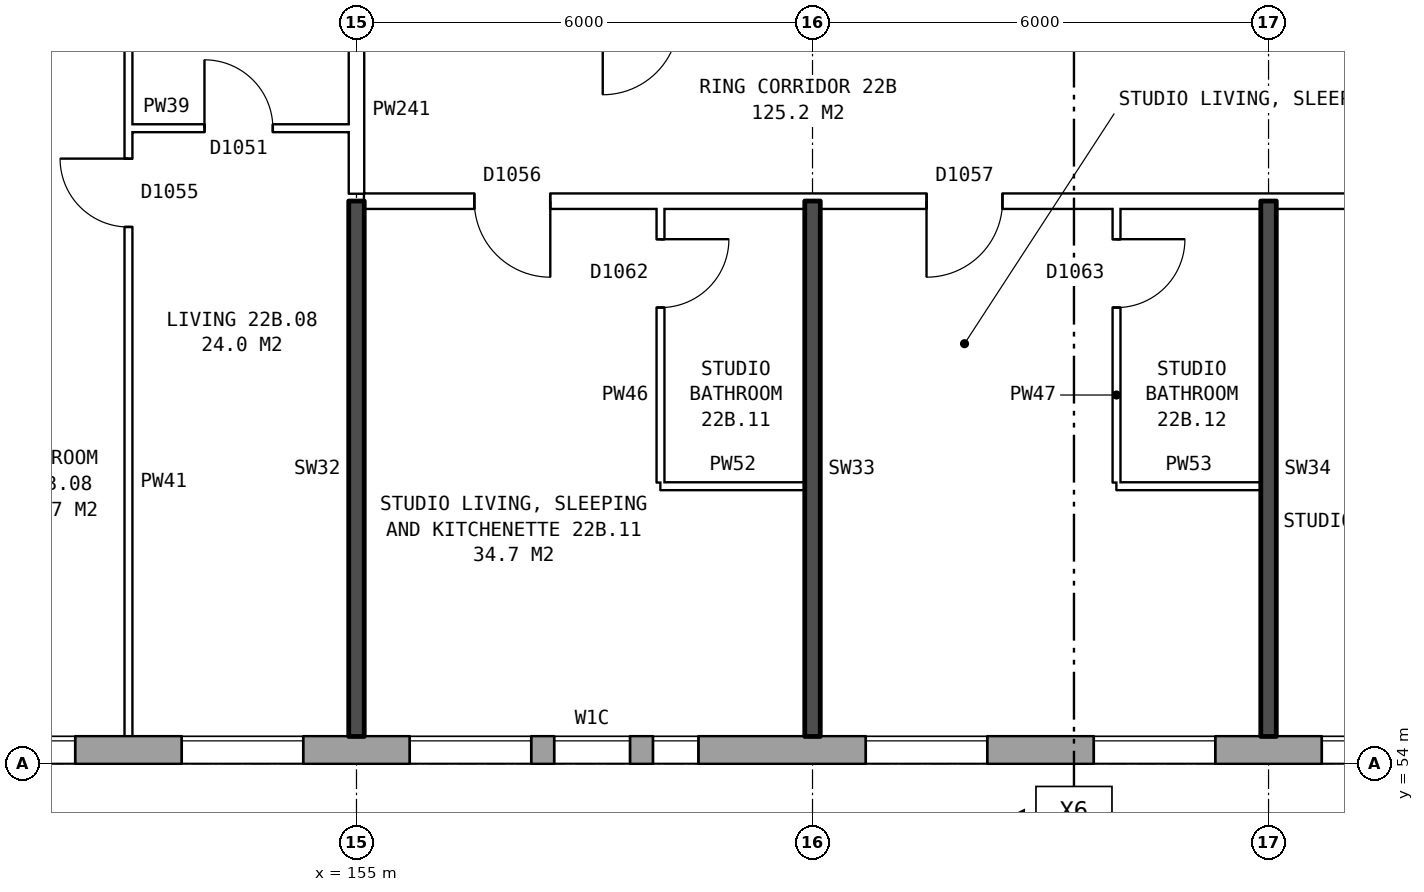
"""IFC4 building model, lengths in metres.
Left out: names, types, materials, properties, quantities, classifications, styles, units other than length and angle.
Written with IfcOpenShell. Run it as: python <this file> out.ifc"""

import sys

from ifc_helpers import new_model, si_unit, direction, frame, frame_2d, origin, place, context, subcontext, project, spatial, rectangle, extrude, element, fill, save


model = new_model("IFC4")
c1 = context("Model", 3, precision=1e-05, world=origin(), true_north=direction((0.0, 1.0)))
c2 = subcontext(c1, "Body", "Model", "MODEL_VIEW")
j1 = project(units=[si_unit("LENGTHUNIT", "METRE"), si_unit("PLANEANGLEUNIT", "RADIAN")], contexts=[c1])
p1 = place(None, origin())
s1 = spatial("IfcSite", under=j1, at=p1, CompositionType="ELEMENT")
p2 = place(p1, origin())
s2 = spatial("IfcBuilding", under=s1, at=p2, CompositionType="ELEMENT")
p3 = place(p2, frame((0.0, 0.0, 80.9)))
s3 = spatial("IfcBuildingStorey", under=s2, at=p3, CompositionType="ELEMENT", Elevation=80.9)
p4 = place(p3, frame((134.075, 54.18, 0.0), z_axis=(0.0, 0.0, 1.0), x_axis=(1.0, 0.0, 0.0)))
e1 = element("IfcWall", 1, at=p4, inside=s3, PredefinedType="STANDARD", context=c2, shape_type="SweptSolid", body=[
    extrude(rectangle(XDim=38.101, YDim=0.36, at=frame_2d((19.05, 0.0))), origin(), (0.0, 0.0, 1.0), 2.85),
])
p5 = place(p4, frame((0.625, 0.0, 0.8)))
e2 = element("IfcOpeningElement", 2, at=p5, cuts=e1, PredefinedType="OPENING", context=c2, shape_type="SweptSolid", body=[
    extrude(rectangle(XDim=1.6, YDim=1.8, at=frame_2d((0.8, 0.9))), frame((0.0, 0.19, 0.0), z_axis=(0.0, -1.0, 0.0), x_axis=(1.0, 0.0, 0.0)), (0.0, 0.0, 1.0), 0.38),
])
p6 = place(p4, frame((3.625, 0.0, 0.8)))
e3 = element("IfcOpeningElement", 3, at=p6, cuts=e1, PredefinedType="OPENING", context=c2, shape_type="SweptSolid", body=[
    extrude(rectangle(XDim=1.6, YDim=1.8, at=frame_2d((0.8, 0.9))), frame((0.0, 0.19, 0.0), z_axis=(0.0, -1.0, 0.0), x_axis=(1.0, 0.0, 0.0)), (0.0, 0.0, 1.0), 0.38),
])
p7 = place(p4, frame((6.625, 0.0, 0.8)))
e4 = element("IfcOpeningElement", 4, at=p7, cuts=e1, PredefinedType="OPENING", context=c2, shape_type="SweptSolid", body=[
    extrude(rectangle(XDim=1.6, YDim=1.8, at=frame_2d((0.8, 0.9))), frame((0.0, 0.19, 0.0), z_axis=(0.0, -1.0, 0.0), x_axis=(1.0, 0.0, 0.0)), (0.0, 0.0, 1.0), 0.38),
])
p8 = place(p4, frame((9.125, 0.0, 0.8)))
e5 = element("IfcOpeningElement", 5, at=p8, cuts=e1, PredefinedType="OPENING", context=c2, shape_type="SweptSolid", body=[
    extrude(rectangle(XDim=1.4, YDim=1.8, at=frame_2d((0.7, 0.9))), frame((0.0, 0.19, 0.0), z_axis=(0.0, -1.0, 0.0), x_axis=(1.0, 0.0, 0.0)), (0.0, 0.0, 1.0), 0.38),
])
p9 = place(p4, frame((12.575, 0.0, 0.8)))
e6 = element("IfcOpeningElement", 6, at=p9, cuts=e1, PredefinedType="OPENING", context=c2, shape_type="SweptSolid", body=[
    extrude(rectangle(XDim=0.6, YDim=0.9, at=frame_2d((0.3, 0.45))), frame((0.0, 0.19, 0.0), z_axis=(0.0, -1.0, 0.0), x_axis=(1.0, 0.0, 0.0)), (0.0, 0.0, 1.0), 0.38),
])
p10 = place(p4, frame((15.625, 0.0, 0.8)))
e7 = element("IfcOpeningElement", 7, at=p10, cuts=e1, PredefinedType="OPENING", context=c2, shape_type="SweptSolid", body=[
    extrude(rectangle(XDim=1.6, YDim=1.8, at=frame_2d((0.8, 0.9))), frame((0.0, 0.19, 0.0), z_axis=(0.0, -1.0, 0.0), x_axis=(1.0, 0.0, 0.0)), (0.0, 0.0, 1.0), 0.38),
])
p11 = place(p4, frame((18.625, 0.0, 0.8)))
e8 = element("IfcOpeningElement", 8, at=p11, cuts=e1, PredefinedType="OPENING", context=c2, shape_type="SweptSolid", body=[
    extrude(rectangle(XDim=1.6, YDim=1.8, at=frame_2d((0.8, 0.9))), frame((0.0, 0.19, 0.0), z_axis=(0.0, -1.0, 0.0), x_axis=(1.0, 0.0, 0.0)), (0.0, 0.0, 1.0), 0.38),
])
p12 = place(p4, frame((21.625, 0.0, 0.8)))
e9 = element("IfcOpeningElement", 9, at=p12, cuts=e1, PredefinedType="OPENING", context=c2, shape_type="SweptSolid", body=[
    extrude(rectangle(XDim=1.6, YDim=1.8, at=frame_2d((0.8, 0.9))), frame((0.0, 0.19, 0.0), z_axis=(0.0, -1.0, 0.0), x_axis=(1.0, 0.0, 0.0)), (0.0, 0.0, 1.0), 0.38),
])
p13 = place(p4, frame((23.525, 0.0, 0.8)))
e10 = element("IfcOpeningElement", 10, at=p13, cuts=e1, PredefinedType="OPENING", context=c2, shape_type="SweptSolid", body=[
    extrude(rectangle(XDim=1.0, YDim=1.8, at=frame_2d((0.5, 0.9))), frame((0.0, 0.19, 0.0), z_axis=(0.0, -1.0, 0.0), x_axis=(1.0, 0.0, 0.0)), (0.0, 0.0, 1.0), 0.38),
])
p14 = place(p4, frame((27.625, 0.0, 0.8)))
e11 = element("IfcOpeningElement", 11, at=p14, cuts=e1, PredefinedType="OPENING", context=c2, shape_type="SweptSolid", body=[
    extrude(rectangle(XDim=1.6, YDim=1.8, at=frame_2d((0.8, 0.9))), frame((0.0, 0.19, 0.0), z_axis=(0.0, -1.0, 0.0), x_axis=(1.0, 0.0, 0.0)), (0.0, 0.0, 1.0), 0.38),
])
p15 = place(p4, frame((30.625, 0.0, 0.8)))
e12 = element("IfcOpeningElement", 12, at=p15, cuts=e1, PredefinedType="OPENING", context=c2, shape_type="SweptSolid", body=[
    extrude(rectangle(XDim=1.6, YDim=1.8, at=frame_2d((0.8, 0.9))), frame((0.0, 0.19, 0.0), z_axis=(0.0, -1.0, 0.0), x_axis=(1.0, 0.0, 0.0)), (0.0, 0.0, 1.0), 0.38),
])
p16 = place(p4, frame((33.625, 0.0, 0.8)))
e13 = element("IfcOpeningElement", 13, at=p16, cuts=e1, PredefinedType="OPENING", context=c2, shape_type="SweptSolid", body=[
    extrude(rectangle(XDim=1.6, YDim=1.8, at=frame_2d((0.8, 0.9))), frame((0.0, 0.19, 0.0), z_axis=(0.0, -1.0, 0.0), x_axis=(1.0, 0.0, 0.0)), (0.0, 0.0, 1.0), 0.38),
])
p17 = place(p4, frame((10.825, 0.0, 1.7)))
e14 = element("IfcOpeningElement", 14, at=p17, cuts=e1, PredefinedType="OPENING", context=c2, shape_type="SweptSolid", body=[
    extrude(rectangle(XDim=0.6, YDim=0.9, at=frame_2d((0.3, 0.45))), frame((0.0, 0.19, 0.0), z_axis=(0.0, -1.0, 0.0), x_axis=(1.0, 0.0, 0.0)), (0.0, 0.0, 1.0), 0.38),
])
p18 = place(p4, frame((13.475, 0.0, 0.8)))
e15 = element("IfcOpeningElement", 15, at=p18, cuts=e1, PredefinedType="OPENING", context=c2, shape_type="SweptSolid", body=[
    extrude(rectangle(XDim=1.2, YDim=1.8, at=frame_2d((0.6, 0.9))), frame((0.0, 0.19, 0.0), z_axis=(0.0, -1.0, 0.0), x_axis=(1.0, 0.0, 0.0)), (0.0, 0.0, 1.0), 0.38),
])
p19 = place(p4, frame((24.825, 0.0, 0.8)))
e16 = element("IfcOpeningElement", 16, at=p19, cuts=e1, PredefinedType="OPENING", context=c2, shape_type="SweptSolid", body=[
    extrude(rectangle(XDim=0.6, YDim=0.9, at=frame_2d((0.3, 0.45))), frame((0.0, 0.19, 0.0), z_axis=(0.0, -1.0, 0.0), x_axis=(1.0, 0.0, 0.0)), (0.0, 0.0, 1.0), 0.38),
])
for number, where, z_axis, x_axis in (
    (17, (159.0, 57.65, 0.0), (0.0, 0.0, 1.0), (1.0, 0.0, 0.0)),
    (18, (165.0, 57.65, 0.0), (0.0, 0.0, 1.0), (1.0, 0.0, 0.0)),
):
    element("IfcWall", number, at=place(p3, frame(where, z_axis=z_axis, x_axis=x_axis)), inside=s3, PredefinedType="PARTITIONING", context=c2, shape_type="SweptSolid", body=[
        extrude(rectangle(XDim=1.9, YDim=0.1, at=frame_2d((0.95, 0.0))), origin(), (0.0, 0.0, 1.0), 2.85),
    ])
p20 = place(p3, frame((155.1, 61.4, 0.0), z_axis=(0.0, 0.0, 1.0), x_axis=(1.0, 0.0, 0.0)))
e19 = element("IfcWall", 19, at=p20, inside=s3, PredefinedType="PARTITIONING", context=c2, shape_type="SweptSolid", body=[
    extrude(rectangle(XDim=19.79, YDim=0.2, at=frame_2d((9.895, 0.0))), origin(), (0.0, 0.0, 1.0), 2.85),
])
p21 = place(p20, frame((1.45, 0.0, 0.0)))
e20 = element("IfcOpeningElement", 20, at=p21, cuts=e19, PredefinedType="OPENING", context=c2, shape_type="SweptSolid", body=[
    extrude(rectangle(XDim=1.0, YDim=2.1, at=frame_2d((0.5, 1.05))), frame((0.0, 0.11, 0.0), z_axis=(0.0, -1.0, 0.0), x_axis=(1.0, 0.0, 0.0)), (0.0, 0.0, 1.0), 0.22),
])
p22 = place(p20, frame((7.4, 0.0, 0.0)))
e21 = element("IfcOpeningElement", 21, at=p22, cuts=e19, PredefinedType="OPENING", context=c2, shape_type="SweptSolid", body=[
    extrude(rectangle(XDim=1.0, YDim=2.1, at=frame_2d((0.5, 1.05))), frame((0.0, 0.11, 0.0), z_axis=(0.0, -1.0, 0.0), x_axis=(1.0, 0.0, 0.0)), (0.0, 0.0, 1.0), 0.22),
])
p23 = place(p20, frame((13.2, 0.0, 0.0)))
e22 = element("IfcOpeningElement", 22, at=p23, cuts=e19, PredefinedType="OPENING", context=c2, shape_type="SweptSolid", body=[
    extrude(rectangle(XDim=1.0, YDim=2.1, at=frame_2d((0.5, 1.05))), frame((0.0, 0.11, 0.0), z_axis=(0.0, -1.0, 0.0), x_axis=(1.0, 0.0, 0.0)), (0.0, 0.0, 1.0), 0.22),
])
p24 = place(p3, frame((152.0, 62.36, 0.0), z_axis=(0.0, 0.0, 1.0), x_axis=(1.0, 0.0, 0.0)))
e23 = element("IfcWall", 23, at=p24, inside=s3, PredefinedType="PARTITIONING", context=c2, shape_type="SweptSolid", body=[
    extrude(rectangle(XDim=2.9, YDim=0.1, at=frame_2d((1.45, 0.0))), origin(), (0.0, 0.0, 1.0), 2.85),
])
p25 = place(p24, frame((1.0, 0.0, 0.0)))
e24 = element("IfcOpeningElement", 24, at=p25, cuts=e23, PredefinedType="OPENING", context=c2, shape_type="SweptSolid", body=[
    extrude(rectangle(XDim=0.9, YDim=2.1, at=frame_2d((0.45, 1.05))), frame((0.0, 0.06, 0.0), z_axis=(0.0, -1.0, 0.0), x_axis=(1.0, 0.0, 0.0)), (0.0, 0.0, 1.0), 0.12),
])
p26 = place(p3, frame((152.0, 54.36, 0.0), z_axis=(0.0, 0.0, 1.0), x_axis=(0.0, 1.0, 0.0)))
e25 = element("IfcWall", 25, at=p26, inside=s3, PredefinedType="PARTITIONING", context=c2, shape_type="SweptSolid", body=[
    extrude(rectangle(XDim=14.34, YDim=0.1, at=frame_2d((7.17, 0.0))), origin(), (0.0, 0.0, 1.0), 2.85),
])
p27 = place(p26, frame((6.7, 0.0, 0.0)))
e26 = element("IfcOpeningElement", 26, at=p27, cuts=e25, PredefinedType="OPENING", context=c2, shape_type="SweptSolid", body=[
    extrude(rectangle(XDim=0.9, YDim=2.1, at=frame_2d((0.45, 1.05))), frame((0.0, 0.06, 0.0), z_axis=(0.0, -1.0, 0.0), x_axis=(1.0, 0.0, 0.0)), (0.0, 0.0, 1.0), 0.12),
])
p28 = place(p26, frame((13.04, 0.0, 0.0)))
e27 = element("IfcOpeningElement", 27, at=p28, cuts=e25, PredefinedType="OPENING", context=c2, shape_type="SweptSolid", body=[
    extrude(rectangle(XDim=0.9, YDim=2.1, at=frame_2d((0.45, 1.05))), frame((0.0, 0.06, 0.0), z_axis=(0.0, -1.0, 0.0), x_axis=(1.0, 0.0, 0.0)), (0.0, 0.0, 1.0), 0.12),
])
p29 = place(p3, frame((155.0, 54.36, 0.0), z_axis=(0.0, 0.0, 1.0), x_axis=(0.0, 1.0, 0.0)))
e28 = element("IfcWall", 28, at=p29, inside=s3, PredefinedType="SOLIDWALL", context=c2, shape_type="SweptSolid", body=[
    extrude(rectangle(XDim=7.04, YDim=0.2, at=frame_2d((3.52, 0.0))), origin(), (0.0, 0.0, 1.0), 2.85),
])
p30 = place(p3, frame((155.0, 61.5, 0.0), z_axis=(0.0, 0.0, 1.0), x_axis=(0.0, 1.0, 0.0)))
e29 = element("IfcWall", 29, at=p30, inside=s3, PredefinedType="PARTITIONING", context=c2, shape_type="SweptSolid", body=[
    extrude(rectangle(XDim=2.2, YDim=0.2, at=frame_2d((1.1, 0.0))), origin(), (0.0, 0.0, 1.0), 2.85),
])
p31 = place(p3, frame((159.0, 57.7, 0.0), z_axis=(0.0, 0.0, 1.0), x_axis=(0.0, 1.0, 0.0)))
e30 = element("IfcWall", 30, at=p31, inside=s3, PredefinedType="PARTITIONING", context=c2, shape_type="SweptSolid", body=[
    extrude(rectangle(XDim=3.6, YDim=0.1, at=frame_2d((1.8, 0.0))), origin(), (0.0, 0.0, 1.0), 2.85),
])
p32 = place(p31, frame((2.3, 0.0, 0.0)))
e31 = element("IfcOpeningElement", 31, at=p32, cuts=e30, PredefinedType="OPENING", context=c2, shape_type="SweptSolid", body=[
    extrude(rectangle(XDim=0.9, YDim=2.1, at=frame_2d((0.45, 1.05))), frame((0.0, 0.06, 0.0), z_axis=(0.0, -1.0, 0.0), x_axis=(1.0, 0.0, 0.0)), (0.0, 0.0, 1.0), 0.12),
])
p33 = place(p3, frame((161.0, 54.36, 0.0), z_axis=(0.0, 0.0, 1.0), x_axis=(0.0, 1.0, 0.0)))
e32 = element("IfcWall", 32, at=p33, inside=s3, PredefinedType="SOLIDWALL", context=c2, shape_type="SweptSolid", body=[
    extrude(rectangle(XDim=7.04, YDim=0.2, at=frame_2d((3.52, 0.0))), origin(), (0.0, 0.0, 1.0), 2.85),
])
p34 = place(p3, frame((165.0, 57.7, 0.0), z_axis=(0.0, 0.0, 1.0), x_axis=(0.0, 1.0, 0.0)))
e33 = element("IfcWall", 33, at=p34, inside=s3, PredefinedType="PARTITIONING", context=c2, shape_type="SweptSolid", body=[
    extrude(rectangle(XDim=3.6, YDim=0.1, at=frame_2d((1.8, 0.0))), origin(), (0.0, 0.0, 1.0), 2.85),
])
p35 = place(p34, frame((2.3, 0.0, 0.0)))
e34 = element("IfcOpeningElement", 34, at=p35, cuts=e33, PredefinedType="OPENING", context=c2, shape_type="SweptSolid", body=[
    extrude(rectangle(XDim=0.9, YDim=2.1, at=frame_2d((0.45, 1.05))), frame((0.0, 0.06, 0.0), z_axis=(0.0, -1.0, 0.0), x_axis=(1.0, 0.0, 0.0)), (0.0, 0.0, 1.0), 0.12),
])
p36 = place(p3, frame((167.0, 54.36, 0.0), z_axis=(0.0, 0.0, 1.0), x_axis=(0.0, 1.0, 0.0)))
e35 = element("IfcWall", 35, at=p36, inside=s3, PredefinedType="SOLIDWALL", context=c2, shape_type="SweptSolid", body=[
    extrude(rectangle(XDim=7.04, YDim=0.2, at=frame_2d((3.52, 0.0))), origin(), (0.0, 0.0, 1.0), 2.85),
])
p37 = place(p10, origin())
e36 = element("IfcWindow", 36, at=p37, inside=s3, PartitioningType="SINGLE_PANEL", PredefinedType="WINDOW", context=c2, shape_type="SweptSolid", body=[
    extrude(rectangle(XDim=1.6, YDim=1.8, at=frame_2d((0.8, 0.9))), frame((0.0, 0.15, 0.0), z_axis=(0.0, -1.0, 0.0), x_axis=(1.0, 0.0, 0.0)), (0.0, 0.0, 1.0), 0.06),
])
fill(e7, e36)
p38 = place(p11, origin())
e37 = element("IfcWindow", 37, at=p38, inside=s3, PartitioningType="SINGLE_PANEL", PredefinedType="WINDOW", context=c2, shape_type="SweptSolid", body=[
    extrude(rectangle(XDim=1.6, YDim=1.8, at=frame_2d((0.8, 0.9))), frame((0.0, 0.15, 0.0), z_axis=(0.0, -1.0, 0.0), x_axis=(1.0, 0.0, 0.0)), (0.0, 0.0, 1.0), 0.06),
])
fill(e8, e37)
p39 = place(p12, origin())
e38 = element("IfcWindow", 38, at=p39, inside=s3, PartitioningType="SINGLE_PANEL", PredefinedType="WINDOW", context=c2, shape_type="SweptSolid", body=[
    extrude(rectangle(XDim=1.6, YDim=1.8, at=frame_2d((0.8, 0.9))), frame((0.0, 0.15, 0.0), z_axis=(0.0, -1.0, 0.0), x_axis=(1.0, 0.0, 0.0)), (0.0, 0.0, 1.0), 0.06),
])
fill(e9, e38)
p40 = place(p13, origin())
e39 = element("IfcWindow", 39, at=p40, inside=s3, PartitioningType="SINGLE_PANEL", PredefinedType="WINDOW", context=c2, shape_type="SweptSolid", body=[
    extrude(rectangle(XDim=1.0, YDim=1.8, at=frame_2d((0.5, 0.9))), frame((0.0, 0.15, 0.0), z_axis=(0.0, -1.0, 0.0), x_axis=(1.0, 0.0, 0.0)), (0.0, 0.0, 1.0), 0.06),
])
fill(e10, e39)
p41 = place(p14, origin())
e40 = element("IfcWindow", 40, at=p41, inside=s3, PartitioningType="SINGLE_PANEL", PredefinedType="WINDOW", context=c2, shape_type="SweptSolid", body=[
    extrude(rectangle(XDim=1.6, YDim=1.8, at=frame_2d((0.8, 0.9))), frame((0.0, 0.15, 0.0), z_axis=(0.0, -1.0, 0.0), x_axis=(1.0, 0.0, 0.0)), (0.0, 0.0, 1.0), 0.06),
])
fill(e11, e40)
p42 = place(p15, origin())
e41 = element("IfcWindow", 41, at=p42, inside=s3, PartitioningType="SINGLE_PANEL", PredefinedType="WINDOW", context=c2, shape_type="SweptSolid", body=[
    extrude(rectangle(XDim=1.6, YDim=1.8, at=frame_2d((0.8, 0.9))), frame((0.0, 0.15, 0.0), z_axis=(0.0, -1.0, 0.0), x_axis=(1.0, 0.0, 0.0)), (0.0, 0.0, 1.0), 0.06),
])
fill(e12, e41)
p43 = place(p16, origin())
e42 = element("IfcWindow", 42, at=p43, inside=s3, PartitioningType="SINGLE_PANEL", PredefinedType="WINDOW", context=c2, shape_type="SweptSolid", body=[
    extrude(rectangle(XDim=1.6, YDim=1.8, at=frame_2d((0.8, 0.9))), frame((0.0, 0.15, 0.0), z_axis=(0.0, -1.0, 0.0), x_axis=(1.0, 0.0, 0.0)), (0.0, 0.0, 1.0), 0.06),
])
fill(e13, e42)
p44 = place(p27, origin())
e43 = element("IfcDoor", 43, at=p44, inside=s3, OperationType="SINGLE_SWING_RIGHT", PredefinedType="DOOR", context=c2, shape_type="SweptSolid", body=[
    extrude(rectangle(XDim=0.9, YDim=2.1, at=frame_2d((0.45, 1.05))), frame((0.0, 0.025, 0.0), z_axis=(0.0, -1.0, 0.0), x_axis=(1.0, 0.0, 0.0)), (0.0, 0.0, 1.0), 0.05),
])
fill(e26, e43)
p45 = place(p25, origin())
e44 = element("IfcDoor", 44, at=p45, inside=s3, OperationType="SINGLE_SWING_LEFT", PredefinedType="DOOR", context=c2, shape_type="SweptSolid", body=[
    extrude(rectangle(XDim=0.9, YDim=2.1, at=frame_2d((0.45, 1.05))), frame((0.0, 0.025, 0.0), z_axis=(0.0, -1.0, 0.0), x_axis=(1.0, 0.0, 0.0)), (0.0, 0.0, 1.0), 0.05),
])
fill(e24, e44)
p46 = place(p21, frame((1.0, 0.0, 0.0), z_axis=(0.0, 0.0, 1.0), x_axis=(-1.0, 0.0, 0.0)))
e45 = element("IfcDoor", 45, at=p46, inside=s3, OperationType="SINGLE_SWING_LEFT", PredefinedType="DOOR", context=c2, shape_type="SweptSolid", body=[
    extrude(rectangle(XDim=1.0, YDim=2.1, at=frame_2d((0.5, 1.05))), frame((0.0, 0.025, 0.0), z_axis=(0.0, -1.0, 0.0), x_axis=(1.0, 0.0, 0.0)), (0.0, 0.0, 1.0), 0.05),
])
fill(e20, e45)
p47 = place(p32, frame((0.9, 0.0, 0.0), z_axis=(0.0, 0.0, 1.0), x_axis=(-1.0, 0.0, 0.0)))
e46 = element("IfcDoor", 46, at=p47, inside=s3, OperationType="SINGLE_SWING_LEFT", PredefinedType="DOOR", context=c2, shape_type="SweptSolid", body=[
    extrude(rectangle(XDim=0.9, YDim=2.1, at=frame_2d((0.45, 1.05))), frame((0.0, 0.025, 0.0), z_axis=(0.0, -1.0, 0.0), x_axis=(1.0, 0.0, 0.0)), (0.0, 0.0, 1.0), 0.05),
])
fill(e31, e46)
p48 = place(p22, frame((1.0, 0.0, 0.0), z_axis=(0.0, 0.0, 1.0), x_axis=(-1.0, 0.0, 0.0)))
e47 = element("IfcDoor", 47, at=p48, inside=s3, OperationType="SINGLE_SWING_RIGHT", PredefinedType="DOOR", context=c2, shape_type="SweptSolid", body=[
    extrude(rectangle(XDim=1.0, YDim=2.1, at=frame_2d((0.5, 1.05))), frame((0.0, 0.025, 0.0), z_axis=(0.0, -1.0, 0.0), x_axis=(1.0, 0.0, 0.0)), (0.0, 0.0, 1.0), 0.05),
])
fill(e21, e47)
p49 = place(p35, frame((0.9, 0.0, 0.0), z_axis=(0.0, 0.0, 1.0), x_axis=(-1.0, 0.0, 0.0)))
e48 = element("IfcDoor", 48, at=p49, inside=s3, OperationType="SINGLE_SWING_LEFT", PredefinedType="DOOR", context=c2, shape_type="SweptSolid", body=[
    extrude(rectangle(XDim=0.9, YDim=2.1, at=frame_2d((0.45, 1.05))), frame((0.0, 0.025, 0.0), z_axis=(0.0, -1.0, 0.0), x_axis=(1.0, 0.0, 0.0)), (0.0, 0.0, 1.0), 0.05),
])
fill(e34, e48)
p50 = place(p19, origin())
e49 = element("IfcWindow", 49, at=p50, inside=s3, PartitioningType="SINGLE_PANEL", PredefinedType="WINDOW", context=c2, shape_type="SweptSolid", body=[
    extrude(rectangle(XDim=0.6, YDim=0.9, at=frame_2d((0.3, 0.45))), frame((0.0, 0.15, 0.0), z_axis=(0.0, -1.0, 0.0), x_axis=(1.0, 0.0, 0.0)), (0.0, 0.0, 1.0), 0.06),
])
fill(e16, e49)
save(model, sys.argv[1])
